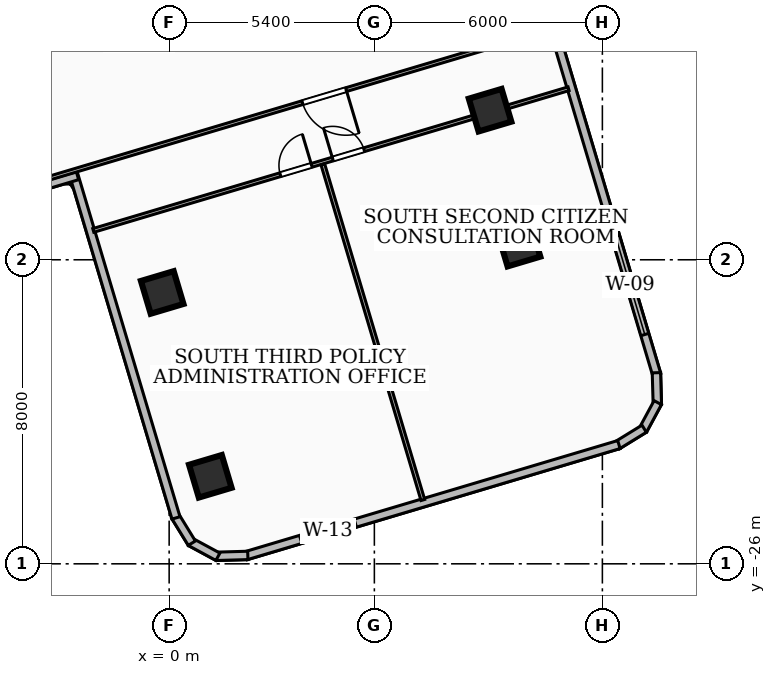
"""IFC4 building model, lengths in metres.
Left out: names, types, materials, properties, quantities, classifications, styles, units other than length and angle.
Written with IfcOpenShell. Run it as: python <this file> out.ifc"""

import sys

from ifc_helpers import new_model, si_unit, direction, frame, frame_2d, origin, origin_2d, place, context, subcontext, project, spatial, rectangle, extrude, element, fill, save


model = new_model("IFC4")
c1 = context("Model", 3, precision=1e-05, world=origin(), true_north=direction((0.0, 1.0)))
c2 = subcontext(c1, "Body", "Model", "MODEL_VIEW")
j1 = project(units=[si_unit("LENGTHUNIT", "METRE"), si_unit("PLANEANGLEUNIT", "RADIAN")], contexts=[c1])
p1 = place(None, origin())
s1 = spatial("IfcSite", under=j1, at=p1, CompositionType="ELEMENT")
p2 = place(p1, origin())
s2 = spatial("IfcBuilding", under=s1, at=p2, CompositionType="ELEMENT")
p3 = place(p2, frame((0.0, 0.0, 141.48)))
s3 = spatial("IfcBuildingStorey", under=s2, at=p3, CompositionType="ELEMENT", Elevation=141.48)
for number, where, z_axis, x_axis in (
    (1, (-0.183, -18.86, 0.0), (0.0, 0.0, 1.0), (0.958, 0.286, 0.0)),
    (2, (8.445, -14.064, 0.0), (0.0, 0.0, 1.0), (0.958, 0.286, 0.0)),
    (3, (1.083, -23.697, 0.0), (0.0, 0.0, 1.0), (0.958, 0.286, 0.0)),
    (4, (9.208, -17.615, 0.0), (0.0, 0.0, 1.0), (0.958, 0.286, 0.0)),
):
    element("IfcColumn", number, at=place(p3, frame(where, z_axis=z_axis, x_axis=x_axis)), inside=s3, PredefinedType="COLUMN", context=c2, shape_type="SweptSolid", body=[
        extrude(rectangle(XDim=0.9, YDim=0.9, at=origin_2d()), origin(), (0.0, 0.0, 1.0), 3.6),
    ])
p4 = place(p3, frame((10.129, -11.957, 0.0), z_axis=(0.0, 0.0, 1.0), x_axis=(0.285599672934, -0.958349010966, 0.0)))
e5 = element("IfcWall", 5, at=p4, inside=s3, PredefinedType="SOLIDWALL", context=c2, shape_type="SweptSolid", body=[
    extrude(rectangle(XDim=9.458, YDim=0.22, at=frame_2d((4.729, 0.0))), origin(), (0.0, 0.0, 1.0), 3.32),
])
p5 = place(p4, frame((5.658, 0.0, 0.85)))
e6 = element("IfcOpeningElement", 6, at=p5, cuts=e5, PredefinedType="OPENING", context=c2, shape_type="SweptSolid", body=[
    extrude(rectangle(XDim=2.7, YDim=1.65, at=frame_2d((1.35, 0.825))), frame((0.0, 0.12, 0.0), z_axis=(0.0, -1.0, 0.0), x_axis=(1.0, 0.0, 0.0)), (0.0, 0.0, 1.0), 0.24),
])
p6 = place(p3, frame((12.822, -20.972, 0.0), z_axis=(0.0, 0.0, 1.0), x_axis=(0.028676726094, -0.999588738122, 0.0)))
e7 = element("IfcWall", 7, at=p6, inside=s3, PredefinedType="SOLIDWALL", context=c2, shape_type="SweptSolid", body=[
    extrude(rectangle(XDim=0.834, YDim=0.22, at=frame_2d((0.417, 0.0))), origin(), (0.0, 0.0, 1.0), 3.32),
])
p7 = place(p3, frame((12.857, -21.759, 0.0), z_axis=(0.0, 0.0, 1.0), x_axis=(-0.47569769932, -0.879608832869, 0.0)))
e8 = element("IfcWall", 8, at=p7, inside=s3, PredefinedType="SOLIDWALL", context=c2, shape_type="SweptSolid", body=[
    extrude(rectangle(XDim=0.82, YDim=0.22, at=frame_2d((0.41, 0.0))), origin(), (0.0, 0.0, 1.0), 3.32),
])
p8 = place(p3, frame((12.5, -22.445, 0.0), z_axis=(0.0, 0.0, 1.0), x_axis=(-0.851597982144, -0.524195456684, 0.0)))
e9 = element("IfcWall", 9, at=p8, inside=s3, PredefinedType="SOLIDWALL", context=c2, shape_type="SweptSolid", body=[
    extrude(rectangle(XDim=0.834, YDim=0.22, at=frame_2d((0.417, 0.0))), origin(), (0.0, 0.0, 1.0), 3.32),
])
p9 = place(p3, frame((11.835, -22.862, 0.0), z_axis=(0.0, 0.0, 1.0), x_axis=(-0.958339179484, -0.285632661063, 0.0)))
e10 = element("IfcWall", 10, at=p9, inside=s3, PredefinedType="SOLIDWALL", context=c2, shape_type="SweptSolid", body=[
    extrude(rectangle(XDim=10.24, YDim=0.22, at=frame_2d((5.12, 0.0))), origin(), (0.0, 0.0, 1.0), 3.32),
])
p10 = place(p9, frame((7.238, 0.0, 0.85)))
e11 = element("IfcOpeningElement", 11, at=p10, cuts=e10, PredefinedType="OPENING", context=c2, shape_type="SweptSolid", body=[
    extrude(rectangle(XDim=1.5, YDim=1.8, at=frame_2d((0.75, 0.9))), frame((0.0, 0.12, 0.0), z_axis=(0.0, -1.0, 0.0), x_axis=(1.0, 0.0, 0.0)), (0.0, 0.0, 1.0), 0.24),
])
p11 = place(p3, frame((2.07, -25.779, 0.0), z_axis=(0.0, 0.0, 1.0), x_axis=(-0.999588738122, -0.028676726094, 0.0)))
e12 = element("IfcWall", 12, at=p11, inside=s3, PredefinedType="SOLIDWALL", context=c2, shape_type="SweptSolid", body=[
    extrude(rectangle(XDim=0.834, YDim=0.22, at=frame_2d((0.417, 0.0))), origin(), (0.0, 0.0, 1.0), 3.32),
])
p12 = place(p3, frame((1.283, -25.814, 0.0), z_axis=(0.0, 0.0, 1.0), x_axis=(-0.879608832869, 0.47569769932, 0.0)))
e13 = element("IfcWall", 13, at=p12, inside=s3, PredefinedType="SOLIDWALL", context=c2, shape_type="SweptSolid", body=[
    extrude(rectangle(XDim=0.82, YDim=0.22, at=frame_2d((0.41, 0.0))), origin(), (0.0, 0.0, 1.0), 3.32),
])
p13 = place(p3, frame((0.597, -25.457, 0.0), z_axis=(0.0, 0.0, 1.0), x_axis=(-0.524195456684, 0.851597982144, 0.0)))
e14 = element("IfcWall", 14, at=p13, inside=s3, PredefinedType="SOLIDWALL", context=c2, shape_type="SweptSolid", body=[
    extrude(rectangle(XDim=0.834, YDim=0.22, at=frame_2d((0.417, 0.0))), origin(), (0.0, 0.0, 1.0), 3.32),
])
p14 = place(p3, frame((0.18, -24.792, 0.0), z_axis=(0.0, 0.0, 1.0), x_axis=(-0.28557596478, 0.958356075966, 0.0)))
e15 = element("IfcWall", 15, at=p14, inside=s3, PredefinedType="SOLIDWALL", context=c2, shape_type="SweptSolid", body=[
    extrude(rectangle(XDim=9.458, YDim=0.22, at=frame_2d((4.729, 0.0))), origin(), (0.0, 0.0, 1.0), 2.55),
])
p15 = place(p3, frame((-2.412, -15.787, 0.0), z_axis=(0.0, 0.0, 1.0), x_axis=(-0.958315274342, -0.285712854037, 0.0)))
e16 = element("IfcWall", 16, at=p15, inside=s3, PredefinedType="SOLIDWALL", context=c2, shape_type="SweptSolid", body=[
    extrude(rectangle(XDim=6.139, YDim=0.22, at=frame_2d((3.069, 0.0))), origin(), (0.0, 0.0, 1.0), 2.55),
])
p16 = place(p3, frame((14.279, -10.655, 0.0), z_axis=(0.0, 0.0, 1.0), x_axis=(-0.958329257389, -0.285665949025, 0.0)))
e17 = element("IfcWall", 17, at=p16, inside=s3, PredefinedType="PARTITIONING", context=c2, shape_type="SweptSolid", body=[
    extrude(rectangle(XDim=20.66, YDim=0.1, at=frame_2d((10.33, 0.0))), origin(), (0.0, 0.0, 1.0), 2.55),
])
p17 = place(p16, frame((10.04, 0.0, 0.0)))
e18 = element("IfcOpeningElement", 18, at=p17, cuts=e17, PredefinedType="OPENING", context=c2, shape_type="SweptSolid", body=[
    extrude(rectangle(XDim=1.2, YDim=2.1, at=frame_2d((0.6, 1.05))), frame((0.0, 0.06, 0.0), z_axis=(0.0, -1.0, 0.0), x_axis=(1.0, 0.0, 0.0)), (0.0, 0.0, 1.0), 0.12),
])
p18 = place(p3, frame((4.044, -15.49, 0.0), z_axis=(0.0, 0.0, 1.0), x_axis=(0.285631393534, -0.95833955727, 0.0)))
e19 = element("IfcWall", 19, at=p18, inside=s3, PredefinedType="PARTITIONING", context=c2, shape_type="SweptSolid", body=[
    extrude(rectangle(XDim=9.215, YDim=0.1, at=frame_2d((4.607, 0.0))), origin(), (0.0, 0.0, 1.0), 2.812),
])
p19 = place(p3, frame((-1.996, -17.228, 0.0), z_axis=(0.0, 0.0, 1.0), x_axis=(0.958326854981, 0.285674008308, 0.0)))
e20 = element("IfcWall", 20, at=p19, inside=s3, PredefinedType="PARTITIONING", context=c2, shape_type="SweptSolid", body=[
    extrude(rectangle(XDim=13.05, YDim=0.1, at=frame_2d((6.525, 0.0))), origin(), (0.0, 0.0, 1.0), 2.55),
])
p20 = place(p19, frame((5.135, 0.0, 0.0)))
e21 = element("IfcOpeningElement", 21, at=p20, cuts=e20, PredefinedType="OPENING", context=c2, shape_type="SweptSolid", body=[
    extrude(rectangle(XDim=0.86, YDim=2.04, at=frame_2d((0.43, 1.02))), frame((0.0, 0.06, 0.0), z_axis=(0.0, -1.0, 0.0), x_axis=(1.0, 0.0, 0.0)), (0.0, 0.0, 1.0), 0.12),
])
p21 = place(p19, frame((6.575, 0.0, 0.0)))
e22 = element("IfcOpeningElement", 22, at=p21, cuts=e20, PredefinedType="OPENING", context=c2, shape_type="SweptSolid", body=[
    extrude(rectangle(XDim=0.86, YDim=2.04, at=frame_2d((0.43, 1.02))), frame((0.0, 0.06, 0.0), z_axis=(0.0, -1.0, 0.0), x_axis=(1.0, 0.0, 0.0)), (0.0, 0.0, 1.0), 0.12),
])
p22 = place(p5, origin())
e23 = element("IfcWindow", 23, at=p22, inside=s3, PartitioningType="SINGLE_PANEL", PredefinedType="WINDOW", context=c2, shape_type="SweptSolid", body=[
    extrude(rectangle(XDim=2.7, YDim=1.65, at=frame_2d((1.35, 0.825))), frame((0.0, 0.03, 0.0), z_axis=(0.0, -1.0, 0.0), x_axis=(1.0, 0.0, 0.0)), (0.0, 0.0, 1.0), 0.06),
])
fill(e6, e23)
p23 = place(p10, origin())
e24 = element("IfcWindow", 24, at=p23, inside=s3, PartitioningType="SINGLE_PANEL", PredefinedType="WINDOW", context=c2, shape_type="SweptSolid", body=[
    extrude(rectangle(XDim=1.5, YDim=1.8, at=frame_2d((0.75, 0.9))), frame((0.0, 0.03, 0.0), z_axis=(0.0, -1.0, 0.0), x_axis=(1.0, 0.0, 0.0)), (0.0, 0.0, 1.0), 0.06),
])
fill(e11, e24)
p24 = place(p17, origin())
e25 = element("IfcDoor", 25, at=p24, inside=s3, OperationType="SINGLE_SWING_LEFT", PredefinedType="DOOR", context=c2, shape_type="SweptSolid", body=[
    extrude(rectangle(XDim=1.2, YDim=2.1, at=frame_2d((0.6, 1.05))), frame((0.0, 0.025, 0.0), z_axis=(0.0, -1.0, 0.0), x_axis=(1.0, 0.0, 0.0)), (0.0, 0.0, 1.0), 0.05),
])
fill(e18, e25)
p25 = place(p20, origin())
e26 = element("IfcDoor", 26, at=p25, inside=s3, OperationType="SINGLE_SWING_RIGHT", PredefinedType="DOOR", context=c2, shape_type="SweptSolid", body=[
    extrude(rectangle(XDim=0.86, YDim=2.04, at=frame_2d((0.43, 1.02))), frame((0.0, 0.025, 0.0), z_axis=(0.0, -1.0, 0.0), x_axis=(1.0, 0.0, 0.0)), (0.0, 0.0, 1.0), 0.05),
])
fill(e21, e26)
p26 = place(p21, origin())
e27 = element("IfcDoor", 27, at=p26, inside=s3, OperationType="SINGLE_SWING_LEFT", PredefinedType="DOOR", context=c2, shape_type="SweptSolid", body=[
    extrude(rectangle(XDim=0.86, YDim=2.04, at=frame_2d((0.43, 1.02))), frame((0.0, 0.025, 0.0), z_axis=(0.0, -1.0, 0.0), x_axis=(1.0, 0.0, 0.0)), (0.0, 0.0, 1.0), 0.05),
])
fill(e22, e27)
save(model, sys.argv[1])
